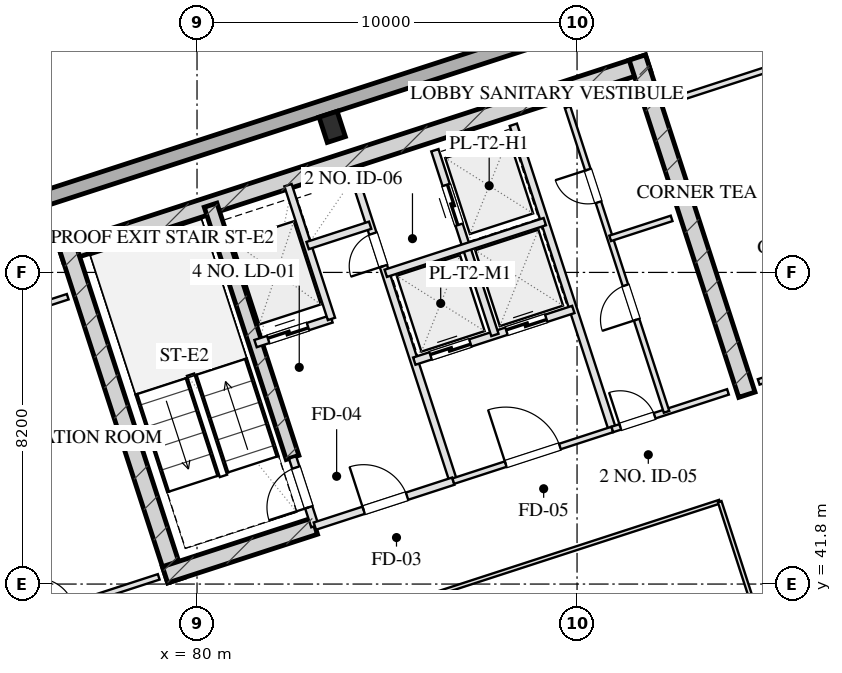
"""IFC4 building model, lengths in metres.
Left out: names, types, materials, properties, quantities, classifications, styles, units other than length and angle.
Written with IfcOpenShell. Run it as: python <this file> out.ifc"""

import sys

from ifc_helpers import new_model, si_unit, direction, frame, frame_2d, origin, origin_2d, place, context, subcontext, project, spatial, rectangle, hollow_rectangle, extrude, element, fill, save


model = new_model("IFC4")
c1 = context("Model", 3, precision=1e-05, world=origin(), true_north=direction((0.0, 1.0)))
c2 = subcontext(c1, "Body", "Model", "MODEL_VIEW")
j1 = project(units=[si_unit("LENGTHUNIT", "METRE"), si_unit("PLANEANGLEUNIT", "RADIAN")], contexts=[c1])
p1 = place(None, origin())
s1 = spatial("IfcSite", under=j1, at=p1, CompositionType="ELEMENT")
p2 = place(p1, origin())
s2 = spatial("IfcBuilding", under=s1, at=p2, CompositionType="ELEMENT")
p3 = place(p2, frame((0.0, 0.0, 212.75)))
s3 = spatial("IfcBuildingStorey", under=s2, at=p3, CompositionType="ELEMENT", Elevation=212.75)
p4 = place(p3, frame((76.415, 50.489, 0.0), z_axis=(0.0, 0.0, 1.0), x_axis=(0.951056810414, 0.309016089169, 0.0)))
e1 = element("IfcWall", 1, at=p4, inside=s3, PredefinedType="SHEAR", context=c2, shape_type="SweptSolid", body=[
    extrude(rectangle(XDim=16.25, YDim=0.45, at=frame_2d((8.125, 0.0))), origin(), (0.0, 0.0, 1.0), 3.45),
])
for number, where, z_axis, x_axis in (
    (2, (79.442, 41.899, 0.0), (0.0, 0.0, 1.0), (-0.309, 0.951, 0.0)),
    (3, (94.469, 46.781, 0.0), (0.0, 0.0, 1.0), (-0.309, 0.951, 0.0)),
):
    element("IfcWall", number, at=place(p3, frame(where, z_axis=z_axis, x_axis=x_axis)), inside=s3, PredefinedType="SHEAR", context=c2, shape_type="SweptSolid", body=[
        extrude(rectangle(XDim=9.33, YDim=0.45, at=frame_2d((4.665, 0.0))), origin(), (0.0, 0.0, 1.0), 3.45),
    ])
p5 = place(p3, frame((82.514, 45.131, 0.0), z_axis=(0.0, 0.0, 1.0), x_axis=(-0.308988790936, 0.951065679686, 0.0)))
e4 = element("IfcWall", 4, at=p5, inside=s3, PredefinedType="SHEAR", context=c2, shape_type="SweptSolid", body=[
    extrude(rectangle(XDim=6.98, YDim=0.35, at=frame_2d((3.49, 0.0))), origin(), (0.0, 0.0, 1.0), 3.45),
])
p6 = place(p3, frame((79.159, 42.043, 0.0), z_axis=(0.0, 0.0, 1.0), x_axis=(0.951047485828, 0.309044785913, 0.0)))
e5 = element("IfcWall", 5, at=p6, inside=s3, PredefinedType="SHEAR", context=c2, shape_type="SweptSolid", body=[
    extrude(rectangle(XDim=4.145, YDim=0.45, at=frame_2d((2.073, 0.0))), origin(), (0.0, 0.0, 1.0), 3.45),
])
p7 = place(p3, frame((95.572, 56.461, 0.0), z_axis=(0.0, 0.0, 1.0), x_axis=(0.951056516295, 0.309016994375, 0.0)))
e6 = element("IfcColumn", 6, at=p7, inside=s3, PredefinedType="COLUMN", context=c2, shape_type="SweptSolid", body=[
    extrude(hollow_rectangle(XDim=1.15, YDim=1.15, WallThickness=0.04, at=origin_2d()), origin(), (0.0, 0.0, 1.0), 3.451),
])
p8 = place(p3, frame((83.557, 53.83, 0.0), z_axis=(0.0, 0.0, 1.0), x_axis=(0.951056516295, 0.309016994375, 0.0)))
e7 = element("IfcColumn", 7, at=p8, inside=s3, PredefinedType="COLUMN", context=c2, shape_type="SweptSolid", body=[
    extrude(hollow_rectangle(XDim=0.5, YDim=0.7, WallThickness=0.025, at=origin_2d()), origin(), (0.0, 0.0, 1.0), 3.451),
])
p9 = place(p3, frame((82.618, 11.414, 0.0), z_axis=(0.0, 0.0, 1.0), x_axis=(-0.309016491071, 0.951056679828, 0.0)))
e8 = element("IfcWall", 8, at=p9, inside=s3, PredefinedType="SOLIDWALL", context=c2, shape_type="SweptSolid", body=[
    extrude(rectangle(XDim=38.4, YDim=0.4, at=frame_2d((19.2, 0.0))), origin(), (0.0, 0.0, 1.0), 2.55),
])
p10 = place(p9, frame((11.75, 0.0, 0.75)))
e9 = element("IfcOpeningElement", 9, at=p10, cuts=e8, PredefinedType="OPENING", context=c2, shape_type="SweptSolid", body=[
    extrude(rectangle(XDim=2.1, YDim=1.4, at=frame_2d((1.05, 0.7))), frame((0.0, 0.21, 0.0), z_axis=(0.0, -1.0, 0.0), x_axis=(1.0, 0.0, 0.0)), (0.0, 0.0, 1.0), 0.42),
])
p11 = place(p9, frame((15.55, 0.0, 0.75)))
e10 = element("IfcOpeningElement", 10, at=p11, cuts=e8, PredefinedType="OPENING", context=c2, shape_type="SweptSolid", body=[
    extrude(rectangle(XDim=2.1, YDim=1.4, at=frame_2d((1.05, 0.7))), frame((0.0, 0.21, 0.0), z_axis=(0.0, -1.0, 0.0), x_axis=(1.0, 0.0, 0.0)), (0.0, 0.0, 1.0), 0.42),
])
p12 = place(p9, frame((20.75, 0.0, 0.75)))
e11 = element("IfcOpeningElement", 11, at=p12, cuts=e8, PredefinedType="OPENING", context=c2, shape_type="SweptSolid", body=[
    extrude(rectangle(XDim=2.1, YDim=1.4, at=frame_2d((1.05, 0.7))), frame((0.0, 0.21, 0.0), z_axis=(0.0, -1.0, 0.0), x_axis=(1.0, 0.0, 0.0)), (0.0, 0.0, 1.0), 0.42),
])
p13 = place(p9, frame((24.55, 0.0, 0.75)))
e12 = element("IfcOpeningElement", 12, at=p13, cuts=e8, PredefinedType="OPENING", context=c2, shape_type="SweptSolid", body=[
    extrude(rectangle(XDim=2.1, YDim=1.4, at=frame_2d((1.05, 0.7))), frame((0.0, 0.21, 0.0), z_axis=(0.0, -1.0, 0.0), x_axis=(1.0, 0.0, 0.0)), (0.0, 0.0, 1.0), 0.42),
])
p14 = place(p3, frame((72.165, 50.706, 0.0), z_axis=(0.0, 0.0, 1.0), x_axis=(0.951058012937, 0.309012388148, 0.0)))
e13 = element("IfcWall", 13, at=p14, inside=s3, PredefinedType="SOLIDWALL", context=c2, shape_type="SweptSolid", body=[
    extrude(rectangle(XDim=23.6, YDim=0.4, at=frame_2d((11.8, 0.0))), origin(), (0.0, 0.0, 1.0), 2.55),
])
p15 = place(p3, frame((83.101, 43.324, 0.0), z_axis=(0.0, 0.0, 1.0), x_axis=(-0.309048298632, 0.951046344356, 0.0)))
e14 = element("IfcWall", 14, at=p15, inside=s3, PredefinedType="PARTITIONING", context=c2, shape_type="SweptSolid", body=[
    extrude(rectangle(XDim=1.9, YDim=0.2, at=frame_2d((0.95, 0.0))), origin(), (0.0, 0.0, 1.0), 3.155),
])
p16 = place(p15, frame((0.52, 0.0, 0.0)))
e15 = element("IfcOpeningElement", 15, at=p16, cuts=e14, PredefinedType="OPENING", context=c2, shape_type="SweptSolid", body=[
    extrude(rectangle(XDim=1.1, YDim=2.05, at=frame_2d((0.55, 1.025))), frame((0.0, 0.11, 0.0), z_axis=(0.0, -1.0, 0.0), x_axis=(1.0, 0.0, 0.0)), (0.0, 0.0, 1.0), 0.22),
])
p17 = place(p3, frame((86.743, 44.508, 0.0), z_axis=(0.0, 0.0, 1.0), x_axis=(-0.309016001439, 0.951056838919, 0.0)))
e16 = element("IfcWall", 16, at=p17, inside=s3, PredefinedType="PARTITIONING", context=c2, shape_type="SweptSolid", body=[
    extrude(rectangle(XDim=8.43, YDim=0.2, at=frame_2d((4.215, 0.0))), origin(), (0.0, 0.0, 1.0), 3.155),
])
p18 = place(p17, frame((5.95, 0.0, 0.0)))
e17 = element("IfcOpeningElement", 17, at=p18, cuts=e16, PredefinedType="OPENING", context=c2, shape_type="SweptSolid", body=[
    extrude(rectangle(XDim=0.9, YDim=2.05, at=frame_2d((0.45, 1.025))), frame((0.0, 0.11, 0.0), z_axis=(0.0, -1.0, 0.0), x_axis=(1.0, 0.0, 0.0)), (0.0, 0.0, 1.0), 0.22),
])
p19 = place(p3, frame((83.101, 43.324, 0.0), z_axis=(0.0, 0.0, 1.0), x_axis=(0.951052804469, 0.309028417967, 0.0)))
e18 = element("IfcWall", 18, at=p19, inside=s3, PredefinedType="PARTITIONING", context=c2, shape_type="SweptSolid", body=[
    extrude(rectangle(XDim=3.83, YDim=0.2, at=frame_2d((1.915, 0.0))), origin(), (0.0, 0.0, 1.0), 3.155),
])
p20 = place(p19, frame((1.35, 0.0, 0.0)))
e19 = element("IfcOpeningElement", 19, at=p20, cuts=e18, PredefinedType="OPENING", context=c2, shape_type="SweptSolid", body=[
    extrude(rectangle(XDim=1.2, YDim=2.05, at=frame_2d((0.6, 1.025))), frame((0.0, 0.11, 0.0), z_axis=(0.0, -1.0, 0.0), x_axis=(1.0, 0.0, 0.0)), (0.0, 0.0, 1.0), 0.22),
])
p21 = place(p3, frame((81.54, 48.127, 0.0), z_axis=(0.0, 0.0, 1.0), x_axis=(0.951062257173, 0.308999325213, 0.0)))
e20 = element("IfcWall", 20, at=p21, inside=s3, PredefinedType="PARTITIONING", context=c2, shape_type="SweptSolid", body=[
    extrude(rectangle(XDim=2.1, YDim=0.2, at=frame_2d((1.05, 0.0))), origin(), (0.0, 0.0, 1.0), 3.155),
])
p22 = place(p21, frame((0.35, 0.0, 0.0)))
e21 = element("IfcOpeningElement", 21, at=p22, cuts=e20, PredefinedType="OPENING", context=c2, shape_type="SweptSolid", body=[
    extrude(rectangle(XDim=1.1, YDim=2.05, at=frame_2d((0.55, 1.025))), frame((0.0, 0.11, 0.0), z_axis=(0.0, -1.0, 0.0), x_axis=(1.0, 0.0, 0.0)), (0.0, 0.0, 1.0), 0.22),
])
p23 = place(p3, frame((83.538, 48.776, 0.0), z_axis=(0.0, 0.0, 1.0), x_axis=(-0.3089935693, 0.951064127245, 0.0)))
e22 = element("IfcWall", 22, at=p23, inside=s3, PredefinedType="PARTITIONING", context=c2, shape_type="SweptSolid", body=[
    extrude(rectangle(XDim=3.7, YDim=0.2, at=frame_2d((1.85, 0.0))), origin(), (0.0, 0.0, 1.0), 3.155),
])
p24 = place(p3, frame((82.91, 50.707, 0.0), z_axis=(0.0, 0.0, 1.0), x_axis=(0.951041328149, 0.309063734775, 0.0)))
e23 = element("IfcWall", 23, at=p24, inside=s3, PredefinedType="PARTITIONING", context=c2, shape_type="SweptSolid", body=[
    extrude(rectangle(XDim=1.73, YDim=0.2, at=frame_2d((0.865, 0.0))), origin(), (0.0, 0.0, 1.0), 3.155),
])
p25 = place(p3, frame((90.928, 45.868, 0.0), z_axis=(0.0, 0.0, 1.0), x_axis=(-0.309042196757, 0.951048327176, 0.0)))
e24 = element("IfcWall", 24, at=p25, inside=s3, PredefinedType="PARTITIONING", context=c2, shape_type="SweptSolid", body=[
    extrude(rectangle(XDim=8.43, YDim=0.2, at=frame_2d((4.215, 0.0))), origin(), (0.0, 0.0, 1.0), 3.155),
])
p26 = place(p3, frame((86.743, 44.508, 0.0), z_axis=(0.0, 0.0, 1.0), x_axis=(0.951063829732, 0.308994485023, 0.0)))
e25 = element("IfcWall", 25, at=p26, inside=s3, PredefinedType="PARTITIONING", context=c2, shape_type="SweptSolid", body=[
    extrude(rectangle(XDim=4.4, YDim=0.15, at=frame_2d((2.2, 0.0))), origin(), (0.0, 0.0, 1.0), 3.155),
])
p27 = place(p26, frame((1.45, 0.0, 0.0)))
e26 = element("IfcOpeningElement", 26, at=p27, cuts=e25, PredefinedType="OPENING", context=c2, shape_type="SweptSolid", body=[
    extrude(rectangle(XDim=1.5, YDim=2.05, at=frame_2d((0.75, 1.025))), frame((0.0, 0.085, 0.0), z_axis=(0.0, -1.0, 0.0), x_axis=(1.0, 0.0, 0.0)), (0.0, 0.0, 1.0), 0.17),
])
p28 = place(p3, frame((85.718, 47.666, 0.0), z_axis=(0.0, 0.0, 1.0), x_axis=(0.951058531764, 0.30901079133, 0.0)))
e27 = element("IfcWall", 27, at=p28, inside=s3, PredefinedType="PARTITIONING", context=c2, shape_type="SweptSolid", body=[
    extrude(rectangle(XDim=4.4, YDim=0.2, at=frame_2d((2.2, 0.0))), origin(), (0.0, 0.0, 1.0), 3.155),
])
p29 = place(p28, frame((0.45, 0.0, 0.0)))
e28 = element("IfcOpeningElement", 28, at=p29, cuts=e27, PredefinedType="OPENING", context=c2, shape_type="SweptSolid", body=[
    extrude(rectangle(XDim=1.1, YDim=2.05, at=frame_2d((0.55, 1.025))), frame((0.0, 0.11, 0.0), z_axis=(0.0, -1.0, 0.0), x_axis=(1.0, 0.0, 0.0)), (0.0, 0.0, 1.0), 0.22),
])
p30 = place(p28, frame((2.55, 0.0, 0.0)))
e29 = element("IfcOpeningElement", 29, at=p30, cuts=e27, PredefinedType="OPENING", context=c2, shape_type="SweptSolid", body=[
    extrude(rectangle(XDim=1.1, YDim=2.05, at=frame_2d((0.55, 1.025))), frame((0.0, 0.11, 0.0), z_axis=(0.0, -1.0, 0.0), x_axis=(1.0, 0.0, 0.0)), (0.0, 0.0, 1.0), 0.22),
])
p31 = place(p3, frame((87.838, 48.354, 0.0), z_axis=(0.0, 0.0, 1.0), x_axis=(-0.3090093719, 0.951058992953, 0.0)))
e30 = element("IfcWall", 30, at=p31, inside=s3, PredefinedType="PARTITIONING", context=c2, shape_type="SweptSolid", body=[
    extrude(rectangle(XDim=5.11, YDim=0.2, at=frame_2d((2.555, 0.0))), origin(), (0.0, 0.0, 1.0), 3.155),
])
p32 = place(p31, frame((3.05, 0.0, 0.0)))
e31 = element("IfcOpeningElement", 31, at=p32, cuts=e30, PredefinedType="OPENING", context=c2, shape_type="SweptSolid", body=[
    extrude(rectangle(XDim=1.1, YDim=2.05, at=frame_2d((0.55, 1.025))), frame((0.0, 0.11, 0.0), z_axis=(0.0, -1.0, 0.0), x_axis=(1.0, 0.0, 0.0)), (0.0, 0.0, 1.0), 0.22),
])
p33 = place(p3, frame((84.967, 49.977, 0.0), z_axis=(0.0, 0.0, 1.0), x_axis=(0.951063829732, 0.308994485023, 0.0)))
e32 = element("IfcWall", 32, at=p33, inside=s3, PredefinedType="PARTITIONING", context=c2, shape_type="SweptSolid", body=[
    extrude(rectangle(XDim=4.4, YDim=0.2, at=frame_2d((2.2, 0.0))), origin(), (0.0, 0.0, 1.0), 3.155),
])
p34 = place(p3, frame((90.928, 45.868, 0.0), z_axis=(0.0, 0.0, 1.0), x_axis=(0.951059297078, 0.309008435874, 0.0)))
e33 = element("IfcWall", 33, at=p34, inside=s3, PredefinedType="PARTITIONING", context=c2, shape_type="SweptSolid", body=[
    extrude(rectangle(XDim=3.2, YDim=0.15, at=frame_2d((1.6, 0.0))), origin(), (0.0, 0.0, 1.0), 3.155),
])
p35 = place(p34, frame((0.22, 0.0, 0.0)))
e34 = element("IfcOpeningElement", 34, at=p35, cuts=e33, PredefinedType="OPENING", context=c2, shape_type="SweptSolid", body=[
    extrude(rectangle(XDim=0.95, YDim=2.05, at=frame_2d((0.475, 1.025))), frame((0.0, 0.085, 0.0), z_axis=(0.0, -1.0, 0.0), x_axis=(1.0, 0.0, 0.0)), (0.0, 0.0, 1.0), 0.17),
])
p36 = place(p3, frame((92.355, 46.331, 0.0), z_axis=(0.0, 0.0, 1.0), x_axis=(-0.309007490203, 0.951059604335, 0.0)))
e35 = element("IfcWall", 35, at=p36, inside=s3, PredefinedType="PARTITIONING", context=c2, shape_type="SweptSolid", body=[
    extrude(rectangle(XDim=8.43, YDim=0.15, at=frame_2d((4.215, 0.0))), origin(), (0.0, 0.0, 1.0), 3.155),
])
p37 = place(p36, frame((2.55, 0.0, 0.0)))
e36 = element("IfcOpeningElement", 36, at=p37, cuts=e35, PredefinedType="OPENING", context=c2, shape_type="SweptSolid", body=[
    extrude(rectangle(XDim=0.95, YDim=2.05, at=frame_2d((0.475, 1.025))), frame((0.0, 0.085, 0.0), z_axis=(0.0, -1.0, 0.0), x_axis=(1.0, 0.0, 0.0)), (0.0, 0.0, 1.0), 0.17),
])
p38 = place(p36, frame((5.8, 0.0, 0.0)))
e37 = element("IfcOpeningElement", 37, at=p38, cuts=e35, PredefinedType="OPENING", context=c2, shape_type="SweptSolid", body=[
    extrude(rectangle(XDim=0.9, YDim=2.05, at=frame_2d((0.45, 1.025))), frame((0.0, 0.085, 0.0), z_axis=(0.0, -1.0, 0.0), x_axis=(1.0, 0.0, 0.0)), (0.0, 0.0, 1.0), 0.17),
])
p39 = place(p3, frame((90.871, 50.896, 0.0), z_axis=(0.0, 0.0, 1.0), x_axis=(0.951054116971, 0.309024378638, 0.0)))
e38 = element("IfcWall", 38, at=p39, inside=s3, PredefinedType="PARTITIONING", context=c2, shape_type="SweptSolid", body=[
    extrude(rectangle(XDim=1.7, YDim=0.15, at=frame_2d((0.85, 0.0))), origin(), (0.0, 0.0, 1.0), 3.155),
])
p40 = place(p3, frame((71.081, 47.568, 0.0), z_axis=(0.0, 0.0, 1.0), x_axis=(0.951059431056, 0.309008023519, 0.0)))
e39 = element("IfcWall", 39, at=p40, inside=s3, PredefinedType="PARTITIONING", context=c2, shape_type="SweptSolid", body=[
    extrude(rectangle(XDim=5.8, YDim=0.15, at=frame_2d((2.9, 0.0))), origin(), (0.0, 0.0, 1.0), 3.155),
])
p41 = place(p3, frame((73.476, 40.197, 0.0), z_axis=(0.0, 0.0, 1.0), x_axis=(0.951059431056, 0.309008023519, 0.0)))
e40 = element("IfcWall", 40, at=p41, inside=s3, PredefinedType="PARTITIONING", context=c2, shape_type="SweptSolid", body=[
    extrude(rectangle(XDim=5.8, YDim=0.15, at=frame_2d((2.9, 0.0))), origin(), (0.0, 0.0, 1.0), 2.15),
])
p42 = place(p41, frame((2.436, 0.0, 0.0)))
e41 = element("IfcOpeningElement", 41, at=p42, cuts=e40, PredefinedType="OPENING", context=c2, shape_type="SweptSolid", body=[
    extrude(rectangle(XDim=1.0, YDim=2.05, at=frame_2d((0.5, 1.025))), frame((0.0, 0.085, 0.0), z_axis=(0.0, -1.0, 0.0), x_axis=(1.0, 0.0, 0.0)), (0.0, 0.0, 1.0), 0.17),
])
p43 = place(p3, frame((92.385, 54.49, 0.0), z_axis=(0.0, 0.0, 1.0), x_axis=(0.951055112834, 0.309021313752, 0.0)))
e42 = element("IfcWall", 42, at=p43, inside=s3, PredefinedType="PARTITIONING", context=c2, shape_type="SweptSolid", body=[
    extrude(rectangle(XDim=5.2, YDim=0.15, at=frame_2d((2.6, 0.0))), origin(), (0.0, 0.0, 1.0), 3.155),
])
p44 = place(p3, frame((94.78, 47.119, 0.0), z_axis=(0.0, 0.0, 1.0), x_axis=(0.951055112834, 0.309021313752, 0.0)))
e43 = element("IfcWall", 43, at=p44, inside=s3, PredefinedType="PARTITIONING", context=c2, shape_type="SweptSolid", body=[
    extrude(rectangle(XDim=5.2, YDim=0.15, at=frame_2d((2.6, 0.0))), origin(), (0.0, 0.0, 1.0), 3.155),
])
p45 = place(p44, frame((2.184, 0.0, 0.0)))
e44 = element("IfcOpeningElement", 44, at=p45, cuts=e43, PredefinedType="OPENING", context=c2, shape_type="SweptSolid", body=[
    extrude(rectangle(XDim=1.0, YDim=2.05, at=frame_2d((0.5, 1.025))), frame((0.0, 0.085, 0.0), z_axis=(0.0, -1.0, 0.0), x_axis=(1.0, 0.0, 0.0)), (0.0, 0.0, 1.0), 0.17),
])
p46 = place(p3, frame((80.867, 39.781, 0.0), z_axis=(0.0, 0.0, 1.0), x_axis=(0.951054192928, 0.309024144872, 0.0)))
e45 = element("IfcWall", 45, at=p46, inside=s3, PredefinedType="MOVABLE", context=c2, shape_type="SweptSolid", body=[
    extrude(rectangle(XDim=13.55, YDim=0.1, at=frame_2d((6.775, 0.0))), origin(), (0.0, 0.0, 1.0), 3.155),
])
p47 = place(p3, frame((98.896, 28.142, 0.0), z_axis=(0.0, 0.0, 1.0), x_axis=(-0.30901773025, 0.951056277195, 0.0)))
e46 = element("IfcWall", 46, at=p47, inside=s3, PredefinedType="MOVABLE", context=c2, shape_type="SweptSolid", body=[
    extrude(rectangle(XDim=16.64, YDim=0.1, at=frame_2d((8.32, 0.0))), origin(), (0.0, 0.0, 1.0), 3.155),
])
p48 = place(p47, frame((7.68, 0.0, 0.0)))
e47 = element("IfcOpeningElement", 47, at=p48, cuts=e46, PredefinedType="OPENING", context=c2, shape_type="SweptSolid", body=[
    extrude(rectangle(XDim=1.1, YDim=2.05, at=frame_2d((0.55, 1.025))), frame((0.0, 0.06, 0.0), z_axis=(0.0, -1.0, 0.0), x_axis=(1.0, 0.0, 0.0)), (0.0, 0.0, 1.0), 0.12),
])
p49 = place(p16, origin())
e48 = element("IfcDoor", 48, at=p49, inside=s3, OperationType="SINGLE_SWING_LEFT", PredefinedType="DOOR", context=c2, shape_type="SweptSolid", body=[
    extrude(rectangle(XDim=1.1, YDim=2.05, at=frame_2d((0.55, 1.025))), frame((0.0, 0.025, 0.0), z_axis=(0.0, -1.0, 0.0), x_axis=(1.0, 0.0, 0.0)), (0.0, 0.0, 1.0), 0.05),
])
fill(e15, e48)
p50 = place(p18, origin())
e49 = element("IfcDoor", 49, at=p50, inside=s3, OperationType="SINGLE_SWING_LEFT", PredefinedType="DOOR", context=c2, shape_type="SweptSolid", body=[
    extrude(rectangle(XDim=0.9, YDim=2.05, at=frame_2d((0.45, 1.025))), frame((0.0, 0.025, 0.0), z_axis=(0.0, -1.0, 0.0), x_axis=(1.0, 0.0, 0.0)), (0.0, 0.0, 1.0), 0.05),
])
fill(e17, e49)
p51 = place(p20, origin())
e50 = element("IfcDoor", 50, at=p51, inside=s3, OperationType="SINGLE_SWING_LEFT", PredefinedType="DOOR", context=c2, shape_type="SweptSolid", body=[
    extrude(rectangle(XDim=1.2, YDim=2.05, at=frame_2d((0.6, 1.025))), frame((0.0, 0.025, 0.0), z_axis=(0.0, -1.0, 0.0), x_axis=(1.0, 0.0, 0.0)), (0.0, 0.0, 1.0), 0.05),
])
fill(e19, e50)
p52 = place(p22, origin())
e51 = element("IfcDoor", 51, at=p52, inside=s3, OperationType="DOUBLE_DOOR_SLIDING", PredefinedType="DOOR", context=c2, shape_type="SweptSolid", body=[
    extrude(rectangle(XDim=1.1, YDim=2.05, at=frame_2d((0.55, 1.025))), frame((0.0, 0.025, 0.0), z_axis=(0.0, -1.0, 0.0), x_axis=(1.0, 0.0, 0.0)), (0.0, 0.0, 1.0), 0.05),
])
fill(e21, e51)
p53 = place(p27, origin())
e52 = element("IfcDoor", 52, at=p53, inside=s3, OperationType="SINGLE_SWING_LEFT", PredefinedType="DOOR", context=c2, shape_type="SweptSolid", body=[
    extrude(rectangle(XDim=1.5, YDim=2.05, at=frame_2d((0.75, 1.025))), frame((0.0, 0.025, 0.0), z_axis=(0.0, -1.0, 0.0), x_axis=(1.0, 0.0, 0.0)), (0.0, 0.0, 1.0), 0.05),
])
fill(e26, e52)
p54 = place(p29, origin())
e53 = element("IfcDoor", 53, at=p54, inside=s3, OperationType="DOUBLE_DOOR_SLIDING", PredefinedType="DOOR", context=c2, shape_type="SweptSolid", body=[
    extrude(rectangle(XDim=1.1, YDim=2.05, at=frame_2d((0.55, 1.025))), frame((0.0, 0.025, 0.0), z_axis=(0.0, -1.0, 0.0), x_axis=(1.0, 0.0, 0.0)), (0.0, 0.0, 1.0), 0.05),
])
fill(e28, e53)
p55 = place(p30, origin())
e54 = element("IfcDoor", 54, at=p55, inside=s3, OperationType="DOUBLE_DOOR_SLIDING", PredefinedType="DOOR", context=c2, shape_type="SweptSolid", body=[
    extrude(rectangle(XDim=1.1, YDim=2.05, at=frame_2d((0.55, 1.025))), frame((0.0, 0.025, 0.0), z_axis=(0.0, -1.0, 0.0), x_axis=(1.0, 0.0, 0.0)), (0.0, 0.0, 1.0), 0.05),
])
fill(e29, e54)
p56 = place(p32, origin())
e55 = element("IfcDoor", 55, at=p56, inside=s3, OperationType="DOUBLE_DOOR_SLIDING", PredefinedType="DOOR", context=c2, shape_type="SweptSolid", body=[
    extrude(rectangle(XDim=1.1, YDim=2.05, at=frame_2d((0.55, 1.025))), frame((0.0, 0.025, 0.0), z_axis=(0.0, -1.0, 0.0), x_axis=(1.0, 0.0, 0.0)), (0.0, 0.0, 1.0), 0.05),
])
fill(e31, e55)
p57 = place(p35, origin())
e56 = element("IfcDoor", 56, at=p57, inside=s3, OperationType="SINGLE_SWING_LEFT", PredefinedType="DOOR", context=c2, shape_type="SweptSolid", body=[
    extrude(rectangle(XDim=0.95, YDim=2.05, at=frame_2d((0.475, 1.025))), frame((0.0, 0.025, 0.0), z_axis=(0.0, -1.0, 0.0), x_axis=(1.0, 0.0, 0.0)), (0.0, 0.0, 1.0), 0.05),
])
fill(e34, e56)
p58 = place(p37, origin())
e57 = element("IfcDoor", 57, at=p58, inside=s3, OperationType="SINGLE_SWING_LEFT", PredefinedType="DOOR", context=c2, shape_type="SweptSolid", body=[
    extrude(rectangle(XDim=0.95, YDim=2.05, at=frame_2d((0.475, 1.025))), frame((0.0, 0.025, 0.0), z_axis=(0.0, -1.0, 0.0), x_axis=(1.0, 0.0, 0.0)), (0.0, 0.0, 1.0), 0.05),
])
fill(e36, e57)
p59 = place(p38, origin())
e58 = element("IfcDoor", 58, at=p59, inside=s3, OperationType="SINGLE_SWING_RIGHT", PredefinedType="DOOR", context=c2, shape_type="SweptSolid", body=[
    extrude(rectangle(XDim=0.9, YDim=2.05, at=frame_2d((0.45, 1.025))), frame((0.0, 0.025, 0.0), z_axis=(0.0, -1.0, 0.0), x_axis=(1.0, 0.0, 0.0)), (0.0, 0.0, 1.0), 0.05),
])
fill(e37, e58)
save(model, sys.argv[1])
